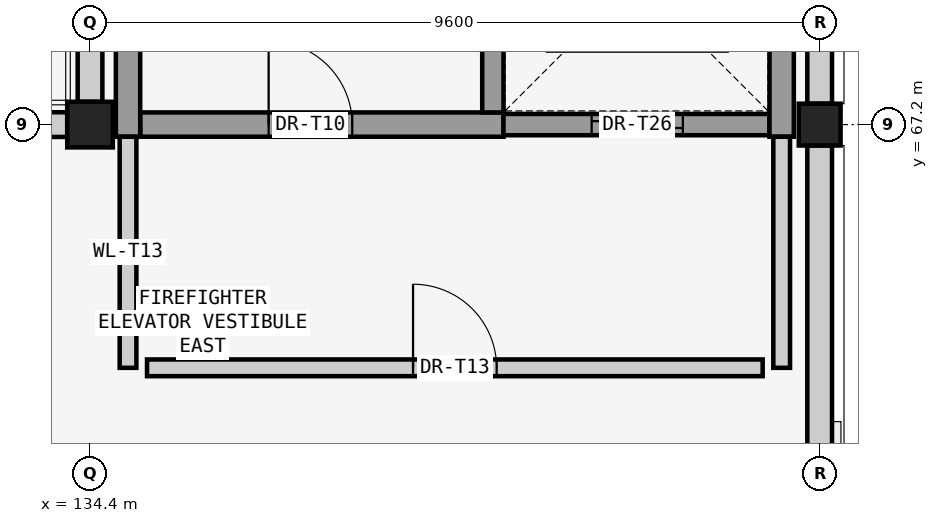
"""IFC4 building model, lengths in metres.
Left out: names, types, materials, properties, quantities, classifications, styles, units other than length and angle.
Written with IfcOpenShell. Run it as: python <this file> out.ifc"""

import sys

from ifc_helpers import new_model, si_unit, direction, frame, frame_2d, origin, origin_2d, place, context, subcontext, project, spatial, rectangle, extrude, element, fill, save


model = new_model("IFC4")
c1 = context("Model", 3, precision=1e-05, world=origin(), true_north=direction((0.0, 1.0)))
c2 = subcontext(c1, "Body", "Model", "MODEL_VIEW")
j1 = project(units=[si_unit("LENGTHUNIT", "METRE"), si_unit("PLANEANGLEUNIT", "RADIAN")], contexts=[c1])
p1 = place(None, origin())
s1 = spatial("IfcSite", under=j1, at=p1, CompositionType="ELEMENT")
p2 = place(p1, origin())
s2 = spatial("IfcBuilding", under=s1, at=p2, CompositionType="ELEMENT")
p3 = place(p2, frame((0.0, 0.0, 24.6)))
s3 = spatial("IfcBuildingStorey", under=s2, at=p3, CompositionType="ELEMENT", Elevation=24.6)
p4 = place(p3, frame((134.4, 67.2, 0.0), z_axis=(0.0, 0.0, 1.0), x_axis=(1.0, 0.0, 0.0)))
e1 = element("IfcColumn", 1, at=p4, inside=s3, PredefinedType="COLUMN", context=c2, shape_type="SweptSolid", body=[
    extrude(rectangle(XDim=0.6, YDim=0.6, at=origin_2d()), origin(), (0.0, 0.0, 1.0), 6.33),
])
p5 = place(p3, frame((144.0, 67.2, 0.0), z_axis=(0.0, 0.0, 1.0), x_axis=(1.0, 0.0, 0.0)))
e2 = element("IfcColumn", 2, at=p5, inside=s3, PredefinedType="COLUMN", context=c2, shape_type="SweptSolid", body=[
    extrude(rectangle(XDim=0.55, YDim=0.55, at=origin_2d()), origin(), (0.0, 0.0, 1.0), 6.33),
])
p6 = place(p3, frame((125.075, 67.2, 0.0), z_axis=(0.0, 0.0, 1.0), x_axis=(1.0, 0.0, 0.0)))
e3 = element("IfcWall", 3, at=p6, inside=s3, PredefinedType="SOLIDWALL", context=c2, shape_type="SweptSolid", body=[
    extrude(rectangle(XDim=9.025, YDim=0.325, at=frame_2d((4.513, 0.0))), origin(), (0.0, 0.0, 1.0), 5.607),
])
p7 = place(p6, frame((1.127, 0.0, 1.0)))
e4 = element("IfcOpeningElement", 4, at=p7, cuts=e3, PredefinedType="OPENING", context=c2, shape_type="SweptSolid", body=[
    extrude(rectangle(XDim=2.8, YDim=1.9, at=frame_2d((1.4, 0.95))), frame((0.0, 0.172, 0.0), z_axis=(0.0, -1.0, 0.0), x_axis=(1.0, 0.0, 0.0)), (0.0, 0.0, 1.0), 0.345),
])
for number, where, z_axis, x_axis in (
    (5, (144.0, 66.925, 0.0), (0.0, 0.0, 1.0), (0.0, -1.0, 0.0)),
    (6, (134.4, 67.5, 0.0), (0.0, 0.0, 1.0), (0.0, 1.0, 0.0)),
    (7, (144.0, 75.3, 0.0), (0.0, 0.0, 1.0), (0.0, -1.0, 0.0)),
):
    element("IfcWall", number, at=place(p3, frame(where, z_axis=z_axis, x_axis=x_axis)), inside=s3, PredefinedType="SOLIDWALL", context=c2, shape_type="SweptSolid", body=[
        extrude(rectangle(XDim=7.825, YDim=0.325, at=frame_2d((3.913, 0.0))), origin(), (0.0, 0.0, 1.0), 5.978),
    ])
p8 = place(p3, frame((135.06, 67.2, 0.0), z_axis=(0.0, 0.0, 1.0), x_axis=(1.0, 0.0, 0.0)))
e8 = element("IfcWall", 8, at=p8, inside=s3, PredefinedType="SHEAR", context=c2, shape_type="SweptSolid", body=[
    extrude(rectangle(XDim=4.78, YDim=0.32, at=frame_2d((2.39, 0.0))), origin(), (0.0, 0.0, 1.0), 6.31),
])
p9 = place(p8, frame((1.69, 0.0, 0.0)))
e9 = element("IfcOpeningElement", 9, at=p9, cuts=e8, PredefinedType="OPENING", context=c2, shape_type="SweptSolid", body=[
    extrude(rectangle(XDim=1.1, YDim=2.2, at=frame_2d((0.55, 1.1))), frame((0.0, 0.17, 0.0), z_axis=(0.0, -1.0, 0.0), x_axis=(1.0, 0.0, 0.0)), (0.0, 0.0, 1.0), 0.34),
])
p10 = place(p3, frame((139.84, 67.2, 0.0), z_axis=(0.0, 0.0, 1.0), x_axis=(1.0, 0.0, 0.0)))
e10 = element("IfcWall", 10, at=p10, inside=s3, PredefinedType="SHEAR", context=c2, shape_type="SweptSolid", body=[
    extrude(rectangle(XDim=3.5, YDim=0.28, at=frame_2d((1.75, 0.0))), origin(), (0.0, 0.0, 1.0), 6.31),
])
p11 = place(p10, frame((1.16, 0.0, 0.0)))
e11 = element("IfcOpeningElement", 11, at=p11, cuts=e10, PredefinedType="OPENING", context=c2, shape_type="SweptSolid", body=[
    extrude(rectangle(XDim=1.2, YDim=2.2, at=frame_2d((0.6, 1.1))), frame((0.0, 0.15, 0.0), z_axis=(0.0, -1.0, 0.0), x_axis=(1.0, 0.0, 0.0)), (0.0, 0.0, 1.0), 0.3),
])
for number, where, z_axis, x_axis in (
    (12, (134.9, 75.4, 0.0), (0.0, 0.0, 1.0), (0.0, -1.0, 0.0)),
    (13, (143.5, 67.04, 0.0), (0.0, 0.0, 1.0), (0.0, 1.0, 0.0)),
):
    element("IfcWall", number, at=place(p3, frame(where, z_axis=z_axis, x_axis=x_axis)), inside=s3, PredefinedType="SHEAR", context=c2, shape_type="SweptSolid", body=[
        extrude(rectangle(XDim=8.36, YDim=0.32, at=frame_2d((4.18, 0.0))), origin(), (0.0, 0.0, 1.0), 6.31),
    ])
p12 = place(p3, frame((139.7, 67.36, 0.0), z_axis=(0.0, 0.0, 1.0), x_axis=(0.0, 1.0, 0.0)))
e14 = element("IfcWall", 14, at=p12, inside=s3, PredefinedType="SHEAR", context=c2, shape_type="SweptSolid", body=[
    extrude(rectangle(XDim=7.72, YDim=0.28, at=frame_2d((3.86, 0.0))), origin(), (0.0, 0.0, 1.0), 6.31),
])
for number, where, z_axis, x_axis in (
    (15, (134.9, 64.0, 0.0), (0.0, 0.0, 1.0), (0.0, 1.0, 0.0)),
    (16, (143.5, 64.0, 0.0), (0.0, 0.0, 1.0), (0.0, 1.0, 0.0)),
):
    element("IfcWall", number, at=place(p3, frame(where, z_axis=z_axis, x_axis=x_axis)), inside=s3, PredefinedType="SOLIDWALL", context=c2, shape_type="SweptSolid", body=[
        extrude(rectangle(XDim=3.04, YDim=0.22, at=frame_2d((1.52, 0.0))), origin(), (0.0, 0.0, 1.0), 6.12),
    ])
p13 = place(p3, frame((135.15, 64.0, 0.0), z_axis=(0.0, 0.0, 1.0), x_axis=(1.0, 0.0, 0.0)))
e17 = element("IfcWall", 17, at=p13, inside=s3, PredefinedType="SOLIDWALL", context=c2, shape_type="SweptSolid", body=[
    extrude(rectangle(XDim=8.1, YDim=0.22, at=frame_2d((4.05, 0.0))), origin(), (0.0, 0.0, 1.0), 6.12),
])
p14 = place(p13, frame((3.5, 0.0, 0.0)))
e18 = element("IfcOpeningElement", 18, at=p14, cuts=e17, PredefinedType="OPENING", context=c2, shape_type="SweptSolid", body=[
    extrude(rectangle(XDim=1.1, YDim=2.2, at=frame_2d((0.55, 1.1))), frame((0.0, 0.12, 0.0), z_axis=(0.0, -1.0, 0.0), x_axis=(1.0, 0.0, 0.0)), (0.0, 0.0, 1.0), 0.24),
])
p15 = place(p9, origin())
e19 = element("IfcDoor", 19, at=p15, inside=s3, OperationType="SINGLE_SWING_LEFT", PredefinedType="DOOR", context=c2, shape_type="SweptSolid", body=[
    extrude(rectangle(XDim=1.1, YDim=2.2, at=frame_2d((0.55, 1.1))), frame((0.0, 0.025, 0.0), z_axis=(0.0, -1.0, 0.0), x_axis=(1.0, 0.0, 0.0)), (0.0, 0.0, 1.0), 0.05),
])
fill(e9, e19)
p16 = place(p11, origin())
e20 = element("IfcDoor", 20, at=p16, inside=s3, OperationType="SLIDING_TO_RIGHT", PredefinedType="DOOR", context=c2, shape_type="SweptSolid", body=[
    extrude(rectangle(XDim=1.2, YDim=2.2, at=frame_2d((0.6, 1.1))), frame((0.0, 0.025, 0.0), z_axis=(0.0, -1.0, 0.0), x_axis=(1.0, 0.0, 0.0)), (0.0, 0.0, 1.0), 0.05),
])
fill(e11, e20)
p17 = place(p14, origin())
e21 = element("IfcDoor", 21, at=p17, inside=s3, OperationType="SINGLE_SWING_LEFT", PredefinedType="DOOR", context=c2, shape_type="SweptSolid", body=[
    extrude(rectangle(XDim=1.1, YDim=2.2, at=frame_2d((0.55, 1.1))), frame((0.0, 0.025, 0.0), z_axis=(0.0, -1.0, 0.0), x_axis=(1.0, 0.0, 0.0)), (0.0, 0.0, 1.0), 0.05),
])
fill(e18, e21)
save(model, sys.argv[1])
